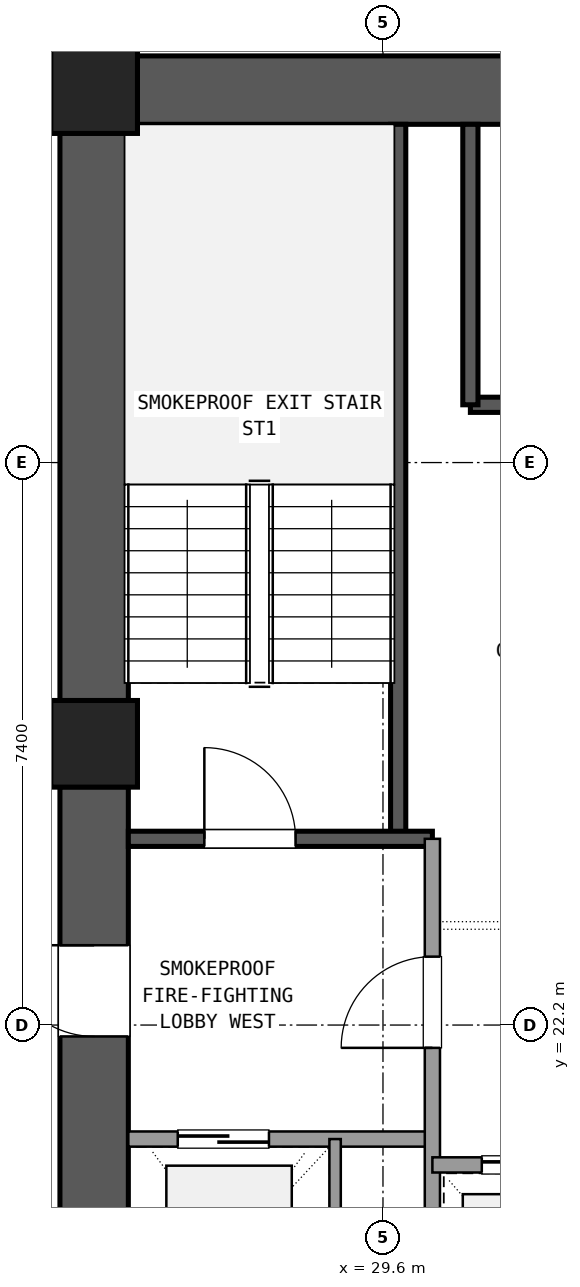
"""IFC4 building model, lengths in metres.
Left out: names, types, materials, properties, quantities, classifications, styles, units other than length and angle.
Written with IfcOpenShell. Run it as: python <this file> out.ifc"""

import sys

from ifc_helpers import new_model, si_unit, direction, frame, frame_2d, origin, origin_2d, place, context, subcontext, project, spatial, rectangle, extrude, element, fill, save


model = new_model("IFC4")
c1 = context("Model", 3, precision=1e-05, world=origin(), true_north=direction((0.0, 1.0)))
c2 = subcontext(c1, "Body", "Model", "MODEL_VIEW")
j1 = project(units=[si_unit("LENGTHUNIT", "METRE"), si_unit("PLANEANGLEUNIT", "RADIAN")], contexts=[c1])
p1 = place(None, origin())
s1 = spatial("IfcSite", under=j1, at=p1, CompositionType="ELEMENT")
p2 = place(p1, origin())
s2 = spatial("IfcBuilding", under=s1, at=p2, CompositionType="ELEMENT")
p3 = place(p2, frame((0.0, 0.0, 31.14)))
s3 = spatial("IfcBuildingStorey", under=s2, at=p3, CompositionType="ELEMENT", Elevation=31.14)
for number, where, z_axis, x_axis in (
    (1, (25.8, 34.5, 0.0), (0.0, 0.0, 1.0), (1.0, 0.0, 0.0)),
    (2, (25.8, 25.9, 0.0), (0.0, 0.0, 1.0), (1.0, 0.0, 0.0)),
):
    element("IfcColumn", number, at=place(p3, frame(where, z_axis=z_axis, x_axis=x_axis)), inside=s3, PredefinedType="COLUMN", context=c2, shape_type="SweptSolid", body=[
        extrude(rectangle(XDim=1.14, YDim=1.14, at=origin_2d()), origin(), (0.0, 0.0, 1.0), 3.6),
    ])
p4 = place(p3, frame((36.435, 34.5, 0.0), z_axis=(0.0, 0.0, 1.0), x_axis=(-1.0, 0.0, 0.0)))
e3 = element("IfcWall", 3, at=p4, inside=s3, PredefinedType="SHEAR", context=c2, shape_type="SweptSolid", body=[
    extrude(rectangle(XDim=10.07, YDim=0.9, at=frame_2d((5.035, 0.0))), origin(), (0.0, 0.0, 1.0), 3.32),
])
p5 = place(p4, frame((4.035, 0.0, 0.0)))
e4 = element("IfcOpeningElement", 4, at=p5, cuts=e3, PredefinedType="OPENING", context=c2, shape_type="SweptSolid", body=[
    extrude(rectangle(XDim=1.2, YDim=2.15, at=frame_2d((0.6, 1.075))), frame((0.0, 0.46, 0.0), z_axis=(0.0, -1.0, 0.0), x_axis=(1.0, 0.0, 0.0)), (0.0, 0.0, 1.0), 0.92),
])
p6 = place(p3, frame((25.8, 33.935, 0.0), z_axis=(0.0, 0.0, 1.0), x_axis=(0.0, -1.0, 0.0)))
e5 = element("IfcWall", 5, at=p6, inside=s3, PredefinedType="SHEAR", context=c2, shape_type="SweptSolid", body=[
    extrude(rectangle(XDim=7.47, YDim=0.9, at=frame_2d((3.735, 0.0))), origin(), (0.0, 0.0, 1.0), 3.32),
])
p7 = place(p3, frame((25.8, 25.335, 0.0), z_axis=(0.0, 0.0, 1.0), x_axis=(0.0, -1.0, 0.0)))
e6 = element("IfcWall", 6, at=p7, inside=s3, PredefinedType="SHEAR", context=c2, shape_type="SweptSolid", body=[
    extrude(rectangle(XDim=7.47, YDim=0.9, at=frame_2d((3.735, 0.0))), origin(), (0.0, 0.0, 1.0), 3.32),
])
p8 = place(p7, frame((2.085, 0.0, 0.0)))
e7 = element("IfcOpeningElement", 7, at=p8, cuts=e6, PredefinedType="OPENING", context=c2, shape_type="SweptSolid", body=[
    extrude(rectangle(XDim=1.2, YDim=2.15, at=frame_2d((0.6, 1.075))), frame((0.0, 0.46, 0.0), z_axis=(0.0, -1.0, 0.0), x_axis=(1.0, 0.0, 0.0)), (0.0, 0.0, 1.0), 0.92),
])
p9 = place(p3, frame((29.8, 24.65, 0.0), z_axis=(0.0, 0.0, 1.0), x_axis=(0.0, 1.0, 0.0)))
e8 = element("IfcWall", 8, at=p9, inside=s3, PredefinedType="SHEAR", context=c2, shape_type="SweptSolid", body=[
    extrude(rectangle(XDim=9.4, YDim=0.2, at=frame_2d((4.7, 0.0))), origin(), (0.0, 0.0, 1.0), 3.32),
])
p10 = place(p3, frame((26.25, 24.65, 0.0), z_axis=(0.0, 0.0, 1.0), x_axis=(1.0, 0.0, 0.0)))
e9 = element("IfcWall", 9, at=p10, inside=s3, PredefinedType="SHEAR", context=c2, shape_type="SweptSolid", body=[
    extrude(rectangle(XDim=4.0, YDim=0.2, at=frame_2d((2.0, 0.0))), origin(), (0.0, 0.0, 1.0), 3.32),
])
p11 = place(p10, frame((1.0, 0.0, 0.0)))
e10 = element("IfcOpeningElement", 10, at=p11, cuts=e9, PredefinedType="OPENING", context=c2, shape_type="SweptSolid", body=[
    extrude(rectangle(XDim=1.2, YDim=2.15, at=frame_2d((0.6, 1.075))), frame((0.0, 0.11, 0.0), z_axis=(0.0, -1.0, 0.0), x_axis=(1.0, 0.0, 0.0)), (0.0, 0.0, 1.0), 0.22),
])
p12 = place(p3, frame((30.75, 30.36, 0.0), z_axis=(0.0, 0.0, 1.0), x_axis=(1.0, 0.0, 0.0)))
e11 = element("IfcWall", 11, at=p12, inside=s3, PredefinedType="SHEAR", context=c2, shape_type="SweptSolid", body=[
    extrude(rectangle(XDim=9.5, YDim=0.2, at=frame_2d((4.75, 0.0))), origin(), (0.0, 0.0, 1.0), 3.32),
])
p13 = place(p3, frame((30.75, 30.36, 0.0), z_axis=(0.0, 0.0, 1.0), x_axis=(0.0, 1.0, 0.0)))
e12 = element("IfcWall", 12, at=p13, inside=s3, PredefinedType="SHEAR", context=c2, shape_type="SweptSolid", body=[
    extrude(rectangle(XDim=3.69, YDim=0.2, at=frame_2d((1.845, 0.0))), origin(), (0.0, 0.0, 1.0), 3.32),
])
p14 = place(p3, frame((26.25, 20.7, 0.0), z_axis=(0.0, 0.0, 1.0), x_axis=(1.0, 0.0, 0.0)))
e13 = element("IfcWall", 13, at=p14, inside=s3, PredefinedType="SOLIDWALL", context=c2, shape_type="SweptSolid", body=[
    extrude(rectangle(XDim=4.0, YDim=0.2, at=frame_2d((2.0, 0.0))), origin(), (0.0, 0.0, 1.0), 2.61),
])
p15 = place(p14, frame((0.65, 0.0, 0.0)))
e14 = element("IfcOpeningElement", 14, at=p15, cuts=e13, PredefinedType="OPENING", context=c2, shape_type="SweptSolid", body=[
    extrude(rectangle(XDim=1.2, YDim=2.15, at=frame_2d((0.6, 1.075))), frame((0.0, 0.11, 0.0), z_axis=(0.0, -1.0, 0.0), x_axis=(1.0, 0.0, 0.0)), (0.0, 0.0, 1.0), 0.22),
])
p16 = place(p3, frame((30.25, 17.75, 0.0), z_axis=(0.0, 0.0, 1.0), x_axis=(0.0, 1.0, 0.0)))
e15 = element("IfcWall", 15, at=p16, inside=s3, PredefinedType="SOLIDWALL", context=c2, shape_type="SweptSolid", body=[
    extrude(rectangle(XDim=6.9, YDim=0.2, at=frame_2d((3.45, 0.0))), origin(), (0.0, 0.0, 1.0), 2.61),
])
p17 = place(p16, frame((4.15, 0.0, 0.0)))
e16 = element("IfcOpeningElement", 16, at=p17, cuts=e15, PredefinedType="OPENING", context=c2, shape_type="SweptSolid", body=[
    extrude(rectangle(XDim=1.2, YDim=2.15, at=frame_2d((0.6, 1.075))), frame((0.0, 0.11, 0.0), z_axis=(0.0, -1.0, 0.0), x_axis=(1.0, 0.0, 0.0)), (0.0, 0.0, 1.0), 0.22),
])
p18 = place(p3, frame((28.97, 17.75, 0.0), z_axis=(0.0, 0.0, 1.0), x_axis=(0.0, 1.0, 0.0)))
e17 = element("IfcWall", 17, at=p18, inside=s3, PredefinedType="PARTITIONING", context=c2, shape_type="SweptSolid", body=[
    extrude(rectangle(XDim=2.95, YDim=0.15, at=frame_2d((1.475, 0.0))), origin(), (0.0, 0.0, 1.0), 2.61),
])
p19 = place(p3, frame((30.25, 20.36, 0.0), z_axis=(0.0, 0.0, 1.0), x_axis=(1.0, 0.0, 0.0)))
e18 = element("IfcWall", 18, at=p19, inside=s3, PredefinedType="SOLIDWALL", context=c2, shape_type="SweptSolid", body=[
    extrude(rectangle(XDim=7.0, YDim=0.2, at=frame_2d((3.5, 0.0))), origin(), (0.0, 0.0, 1.0), 2.61),
])
p20 = place(p19, frame((0.65, 0.0, 0.0)))
e19 = element("IfcOpeningElement", 19, at=p20, cuts=e18, PredefinedType="OPENING", context=c2, shape_type="SweptSolid", body=[
    extrude(rectangle(XDim=1.1, YDim=2.15, at=frame_2d((0.55, 1.075))), frame((0.0, 0.11, 0.0), z_axis=(0.0, -1.0, 0.0), x_axis=(1.0, 0.0, 0.0)), (0.0, 0.0, 1.0), 0.22),
])
p21 = place(p19, frame((2.95, 0.0, 0.0)))
e20 = element("IfcOpeningElement", 20, at=p21, cuts=e18, PredefinedType="OPENING", context=c2, shape_type="SweptSolid", body=[
    extrude(rectangle(XDim=1.1, YDim=2.15, at=frame_2d((0.55, 1.075))), frame((0.0, 0.11, 0.0), z_axis=(0.0, -1.0, 0.0), x_axis=(1.0, 0.0, 0.0)), (0.0, 0.0, 1.0), 0.22),
])
p22 = place(p19, frame((5.25, 0.0, 0.0)))
e21 = element("IfcOpeningElement", 21, at=p22, cuts=e18, PredefinedType="OPENING", context=c2, shape_type="SweptSolid", body=[
    extrude(rectangle(XDim=1.1, YDim=2.15, at=frame_2d((0.55, 1.075))), frame((0.0, 0.11, 0.0), z_axis=(0.0, -1.0, 0.0), x_axis=(1.0, 0.0, 0.0)), (0.0, 0.0, 1.0), 0.22),
])
p23 = place(p11, origin())
e22 = element("IfcDoor", 22, at=p23, inside=s3, OperationType="SINGLE_SWING_LEFT", PredefinedType="DOOR", context=c2, shape_type="SweptSolid", body=[
    extrude(rectangle(XDim=1.2, YDim=2.15, at=frame_2d((0.6, 1.075))), frame((0.0, 0.025, 0.0), z_axis=(0.0, -1.0, 0.0), x_axis=(1.0, 0.0, 0.0)), (0.0, 0.0, 1.0), 0.05),
])
fill(e10, e22)
p24 = place(p15, origin())
e23 = element("IfcDoor", 23, at=p24, inside=s3, OperationType="SLIDING_TO_LEFT", PredefinedType="DOOR", context=c2, shape_type="SweptSolid", body=[
    extrude(rectangle(XDim=1.2, YDim=2.15, at=frame_2d((0.6, 1.075))), frame((0.0, 0.025, 0.0), z_axis=(0.0, -1.0, 0.0), x_axis=(1.0, 0.0, 0.0)), (0.0, 0.0, 1.0), 0.05),
])
fill(e14, e23)
p25 = place(p17, origin())
e24 = element("IfcDoor", 24, at=p25, inside=s3, OperationType="SINGLE_SWING_LEFT", PredefinedType="DOOR", context=c2, shape_type="SweptSolid", body=[
    extrude(rectangle(XDim=1.2, YDim=2.15, at=frame_2d((0.6, 1.075))), frame((0.0, 0.025, 0.0), z_axis=(0.0, -1.0, 0.0), x_axis=(1.0, 0.0, 0.0)), (0.0, 0.0, 1.0), 0.05),
])
fill(e16, e24)
p26 = place(p8, frame((1.2, 0.0, 0.0), z_axis=(0.0, 0.0, 1.0), x_axis=(-1.0, 0.0, 0.0)))
e25 = element("IfcDoor", 25, at=p26, inside=s3, OperationType="SINGLE_SWING_LEFT", PredefinedType="DOOR", context=c2, shape_type="SweptSolid", body=[
    extrude(rectangle(XDim=1.2, YDim=2.15, at=frame_2d((0.6, 1.075))), frame((0.0, 0.025, 0.0), z_axis=(0.0, -1.0, 0.0), x_axis=(1.0, 0.0, 0.0)), (0.0, 0.0, 1.0), 0.05),
])
fill(e7, e25)
p27 = place(p20, origin())
e26 = element("IfcDoor", 26, at=p27, inside=s3, OperationType="SLIDING_TO_LEFT", PredefinedType="DOOR", context=c2, shape_type="SweptSolid", body=[
    extrude(rectangle(XDim=1.1, YDim=2.15, at=frame_2d((0.55, 1.075))), frame((0.0, 0.025, 0.0), z_axis=(0.0, -1.0, 0.0), x_axis=(1.0, 0.0, 0.0)), (0.0, 0.0, 1.0), 0.05),
])
fill(e19, e26)
save(model, sys.argv[1])
